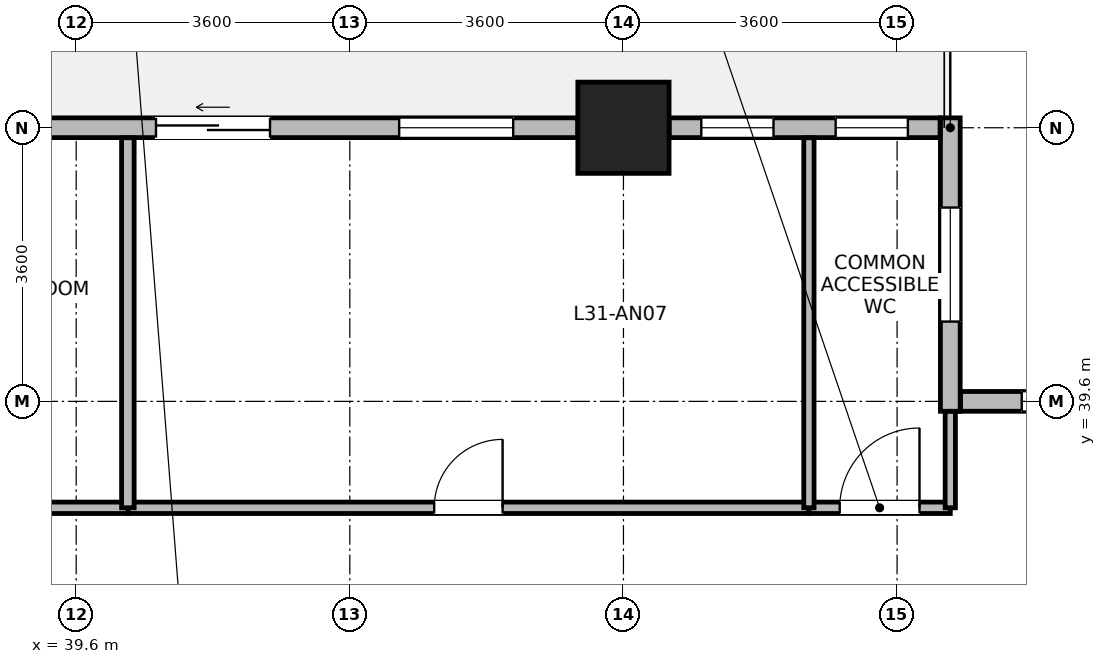
"""IFC4 building model, lengths in metres.
Left out: names, types, materials, properties, quantities, classifications, styles, units other than length and angle.
Written with IfcOpenShell. Run it as: python <this file> out.ifc"""

import sys

from ifc_helpers import new_model, si_unit, direction, frame, frame_2d, origin, origin_2d, place, context, subcontext, project, spatial, rectangle, extrude, source, transform, mapped, element, fill, save


model = new_model("IFC4")
c1 = context("Model", 3, precision=1e-05, world=origin(), true_north=direction((0.0, 1.0)))
c2 = subcontext(c1, "Body", "Model", "MODEL_VIEW")
j1 = project(units=[si_unit("LENGTHUNIT", "METRE"), si_unit("PLANEANGLEUNIT", "RADIAN")], contexts=[c1])
p1 = place(None, origin())
s1 = spatial("IfcSite", under=j1, at=p1, CompositionType="ELEMENT")
p2 = place(p1, origin())
s2 = spatial("IfcBuilding", under=s1, at=p2, CompositionType="ELEMENT")
p3 = place(p2, frame((0.0, 0.0, 123.0)))
s3 = spatial("IfcBuildingStorey", under=s2, at=p3, CompositionType="ELEMENT", Elevation=123.0)
m1 = source(origin(), c2, "Body", "SweptSolid", [
    extrude(rectangle(XDim=1.2, YDim=1.2, at=origin_2d()), origin(), (0.0, 0.0, 1.0), 3.7),
])
p4 = place(p3, frame((46.8, 43.2, 0.0), z_axis=(0.0, 0.0, 1.0), x_axis=(1.0, 0.0, 0.0)))
e1 = element("IfcColumn", 1, at=p4, inside=s3, PredefinedType="COLUMN", context=c2, shape_type="MappedRepresentation", body=[
    mapped(m1, transform((0.0, 0.0, 0.0), x_axis=(1.0, 0.0, 0.0), y_axis=(0.0, 1.0, 0.0), z_axis=(0.0, 0.0, 1.0), scale=1.0)),
])
p5 = place(p3, frame((51.235, 39.6, 0.0), z_axis=(0.0, 0.0, 1.0), x_axis=(1.0, 0.0, 0.0)))
e2 = element("IfcWall", 2, at=p5, inside=s3, PredefinedType="STANDARD", context=c2, shape_type="SweptSolid", body=[
    extrude(rectangle(XDim=9.33, YDim=0.26, at=frame_2d((4.665, 0.0))), origin(), (0.0, 0.0, 1.0), 3.43),
])
p6 = place(p5, frame((0.805, 0.0, 0.85)))
e3 = element("IfcOpeningElement", 3, at=p6, cuts=e2, PredefinedType="OPENING", context=c2, shape_type="SweptSolid", body=[
    extrude(rectangle(XDim=1.5, YDim=1.85, at=frame_2d((0.75, 0.925))), frame((0.0, 0.14, 0.0), z_axis=(0.0, -1.0, 0.0), x_axis=(1.0, 0.0, 0.0)), (0.0, 0.0, 1.0), 0.28),
])
p7 = place(p5, frame((3.915, 0.0, 0.85)))
e4 = element("IfcOpeningElement", 4, at=p7, cuts=e2, PredefinedType="OPENING", context=c2, shape_type="SweptSolid", body=[
    extrude(rectangle(XDim=1.5, YDim=1.85, at=frame_2d((0.75, 0.925))), frame((0.0, 0.14, 0.0), z_axis=(0.0, -1.0, 0.0), x_axis=(1.0, 0.0, 0.0)), (0.0, 0.0, 1.0), 0.28),
])
p8 = place(p5, frame((7.025, 0.0, 0.85)))
e5 = element("IfcOpeningElement", 5, at=p8, cuts=e2, PredefinedType="OPENING", context=c2, shape_type="SweptSolid", body=[
    extrude(rectangle(XDim=1.5, YDim=1.85, at=frame_2d((0.75, 0.925))), frame((0.0, 0.14, 0.0), z_axis=(0.0, -1.0, 0.0), x_axis=(1.0, 0.0, 0.0)), (0.0, 0.0, 1.0), 0.28),
])
p9 = place(p3, frame((51.1, 43.33, 0.0), z_axis=(0.0, 0.0, 1.0), x_axis=(0.0, -1.0, 0.0)))
e6 = element("IfcWall", 6, at=p9, inside=s3, PredefinedType="STANDARD", context=c2, shape_type="SweptSolid", body=[
    extrude(rectangle(XDim=3.86, YDim=0.26, at=frame_2d((1.93, 0.0))), origin(), (0.0, 0.0, 1.0), 3.43),
])
p10 = place(p9, frame((1.18, 0.0, 0.85)))
e7 = element("IfcOpeningElement", 7, at=p10, cuts=e6, PredefinedType="OPENING", context=c2, shape_type="SweptSolid", body=[
    extrude(rectangle(XDim=1.5, YDim=1.85, at=frame_2d((0.75, 0.925))), frame((0.0, 0.14, 0.0), z_axis=(0.0, -1.0, 0.0), x_axis=(1.0, 0.0, 0.0)), (0.0, 0.0, 1.0), 0.28),
])
p11 = place(p3, frame((47.401, 43.2, 0.0), z_axis=(0.0, 0.0, 1.0), x_axis=(1.0, 0.0, 0.0)))
e8 = element("IfcWall", 8, at=p11, inside=s3, PredefinedType="STANDARD", context=c2, shape_type="SweptSolid", body=[
    extrude(rectangle(XDim=3.564, YDim=0.26, at=frame_2d((1.782, 0.0))), origin(), (0.0, 0.0, 1.0), 3.43),
])
p12 = place(p11, frame((0.423, 0.0, 0.85)))
e9 = element("IfcOpeningElement", 9, at=p12, cuts=e8, PredefinedType="OPENING", context=c2, shape_type="SweptSolid", body=[
    extrude(rectangle(XDim=0.95, YDim=1.75, at=frame_2d((0.475, 0.875))), frame((0.0, 0.14, 0.0), z_axis=(0.0, -1.0, 0.0), x_axis=(1.0, 0.0, 0.0)), (0.0, 0.0, 1.0), 0.28),
])
p13 = place(p11, frame((2.191, 0.0, 0.85)))
e10 = element("IfcOpeningElement", 10, at=p13, cuts=e8, PredefinedType="OPENING", context=c2, shape_type="SweptSolid", body=[
    extrude(rectangle(XDim=0.95, YDim=1.75, at=frame_2d((0.475, 0.875))), frame((0.0, 0.14, 0.0), z_axis=(0.0, -1.0, 0.0), x_axis=(1.0, 0.0, 0.0)), (0.0, 0.0, 1.0), 0.28),
])
p14 = place(p3, frame((36.601, 43.2, 0.0), z_axis=(0.0, 0.0, 1.0), x_axis=(1.0, 0.0, 0.0)))
e11 = element("IfcWall", 11, at=p14, inside=s3, PredefinedType="STANDARD", context=c2, shape_type="SweptSolid", body=[
    extrude(rectangle(XDim=9.598, YDim=0.26, at=frame_2d((4.799, 0.0))), origin(), (0.0, 0.0, 1.0), 2.98),
])
p15 = place(p14, frame((4.049, 0.0, 0.0)))
e12 = element("IfcOpeningElement", 12, at=p15, cuts=e11, PredefinedType="OPENING", context=c2, shape_type="SweptSolid", body=[
    extrude(rectangle(XDim=1.5, YDim=2.15, at=frame_2d((0.75, 1.075))), frame((0.0, 0.14, 0.0), z_axis=(0.0, -1.0, 0.0), x_axis=(1.0, 0.0, 0.0)), (0.0, 0.0, 1.0), 0.28),
])
p16 = place(p14, frame((0.85, 0.0, 0.85)))
e13 = element("IfcOpeningElement", 13, at=p16, cuts=e11, PredefinedType="OPENING", context=c2, shape_type="SweptSolid", body=[
    extrude(rectangle(XDim=1.5, YDim=1.85, at=frame_2d((0.75, 0.925))), frame((0.0, 0.14, 0.0), z_axis=(0.0, -1.0, 0.0), x_axis=(1.0, 0.0, 0.0)), (0.0, 0.0, 1.0), 0.28),
])
p17 = place(p14, frame((7.248, 0.0, 0.85)))
e14 = element("IfcOpeningElement", 14, at=p17, cuts=e11, PredefinedType="OPENING", context=c2, shape_type="SweptSolid", body=[
    extrude(rectangle(XDim=1.5, YDim=1.85, at=frame_2d((0.75, 0.925))), frame((0.0, 0.14, 0.0), z_axis=(0.0, -1.0, 0.0), x_axis=(1.0, 0.0, 0.0)), (0.0, 0.0, 1.0), 0.28),
])
p18 = place(p3, frame((40.28, 38.2, 0.0), z_axis=(0.0, 0.0, 1.0), x_axis=(1.0, 0.0, 0.0)))
e15 = element("IfcWall", 15, at=p18, inside=s3, PredefinedType="PARTITIONING", context=c2, shape_type="SweptSolid", body=[
    extrude(rectangle(XDim=8.96, YDim=0.15, at=frame_2d((4.48, 0.0))), origin(), (0.0, 0.0, 1.0), 3.43),
])
p19 = place(p18, frame((4.03, 0.0, 0.0)))
e16 = element("IfcOpeningElement", 16, at=p19, cuts=e15, PredefinedType="OPENING", context=c2, shape_type="SweptSolid", body=[
    extrude(rectangle(XDim=0.9, YDim=2.08, at=frame_2d((0.45, 1.04))), frame((0.0, 0.085, 0.0), z_axis=(0.0, -1.0, 0.0), x_axis=(1.0, 0.0, 0.0)), (0.0, 0.0, 1.0), 0.17),
])
p20 = place(p3, frame((35.42, 38.2, 0.0), z_axis=(0.0, 0.0, 1.0), x_axis=(1.0, 0.0, 0.0)))
e17 = element("IfcWall", 17, at=p20, inside=s3, PredefinedType="PARTITIONING", context=c2, shape_type="SweptSolid", body=[
    extrude(rectangle(XDim=4.86, YDim=0.15, at=frame_2d((2.43, 0.0))), origin(), (0.0, 0.0, 1.0), 3.43),
])
p21 = place(p20, frame((1.955, 0.0, 0.0)))
e18 = element("IfcOpeningElement", 18, at=p21, cuts=e17, PredefinedType="OPENING", context=c2, shape_type="SweptSolid", body=[
    extrude(rectangle(XDim=0.95, YDim=2.1, at=frame_2d((0.475, 1.05))), frame((0.0, 0.085, 0.0), z_axis=(0.0, -1.0, 0.0), x_axis=(1.0, 0.0, 0.0)), (0.0, 0.0, 1.0), 0.17),
])
p22 = place(p3, frame((49.24, 38.2, 0.0), z_axis=(0.0, 0.0, 1.0), x_axis=(1.0, 0.0, 0.0)))
e19 = element("IfcWall", 19, at=p22, inside=s3, PredefinedType="PARTITIONING", context=c2, shape_type="SweptSolid", body=[
    extrude(rectangle(XDim=1.86, YDim=0.15, at=frame_2d((0.93, 0.0))), origin(), (0.0, 0.0, 1.0), 3.43),
])
p23 = place(p22, frame((0.405, 0.0, 0.0)))
e20 = element("IfcOpeningElement", 20, at=p23, cuts=e19, PredefinedType="OPENING", context=c2, shape_type="SweptSolid", body=[
    extrude(rectangle(XDim=1.05, YDim=2.12, at=frame_2d((0.525, 1.06))), frame((0.0, 0.085, 0.0), z_axis=(0.0, -1.0, 0.0), x_axis=(1.0, 0.0, 0.0)), (0.0, 0.0, 1.0), 0.17),
])
p24 = place(p3, frame((40.28, 38.2, 0.0), z_axis=(0.0, 0.0, 1.0), x_axis=(0.0, 1.0, 0.0)))
e21 = element("IfcWall", 21, at=p24, inside=s3, PredefinedType="PARTITIONING", context=c2, shape_type="SweptSolid", body=[
    extrude(rectangle(XDim=4.868, YDim=0.165, at=frame_2d((2.434, 0.0))), origin(), (0.0, 0.0, 1.0), 3.43),
])
p25 = place(p3, frame((49.24, 38.2, 0.0), z_axis=(0.0, 0.0, 1.0), x_axis=(0.0, 1.0, 0.0)))
e22 = element("IfcWall", 22, at=p25, inside=s3, PredefinedType="PARTITIONING", context=c2, shape_type="SweptSolid", body=[
    extrude(rectangle(XDim=4.868, YDim=0.135, at=frame_2d((2.434, 0.0))), origin(), (0.0, 0.0, 1.0), 3.43),
])
p26 = place(p3, frame((51.1, 38.2, 0.0), z_axis=(0.0, 0.0, 1.0), x_axis=(0.0, 1.0, 0.0)))
e23 = element("IfcWall", 23, at=p26, inside=s3, PredefinedType="PARTITIONING", context=c2, shape_type="SweptSolid", body=[
    extrude(rectangle(XDim=1.268, YDim=0.135, at=frame_2d((0.634, 0.0))), origin(), (0.0, 0.0, 1.0), 3.43),
])
p27 = place(p6, origin())
e24 = element("IfcWindow", 24, at=p27, inside=s3, PartitioningType="SINGLE_PANEL", PredefinedType="WINDOW", context=c2, shape_type="SweptSolid", body=[
    extrude(rectangle(XDim=1.5, YDim=1.85, at=frame_2d((0.75, 0.925))), frame((0.0, 0.03, 0.0), z_axis=(0.0, -1.0, 0.0), x_axis=(1.0, 0.0, 0.0)), (0.0, 0.0, 1.0), 0.06),
])
fill(e3, e24)
p28 = place(p10, origin())
e25 = element("IfcWindow", 25, at=p28, inside=s3, PartitioningType="SINGLE_PANEL", PredefinedType="WINDOW", context=c2, shape_type="SweptSolid", body=[
    extrude(rectangle(XDim=1.5, YDim=1.85, at=frame_2d((0.75, 0.925))), frame((0.0, 0.03, 0.0), z_axis=(0.0, -1.0, 0.0), x_axis=(1.0, 0.0, 0.0)), (0.0, 0.0, 1.0), 0.06),
])
fill(e7, e25)
p29 = place(p12, origin())
e26 = element("IfcWindow", 26, at=p29, inside=s3, PartitioningType="SINGLE_PANEL", PredefinedType="WINDOW", context=c2, shape_type="SweptSolid", body=[
    extrude(rectangle(XDim=0.95, YDim=1.75, at=frame_2d((0.475, 0.875))), frame((0.0, 0.03, 0.0), z_axis=(0.0, -1.0, 0.0), x_axis=(1.0, 0.0, 0.0)), (0.0, 0.0, 1.0), 0.06),
])
fill(e9, e26)
p30 = place(p13, origin())
e27 = element("IfcWindow", 27, at=p30, inside=s3, PartitioningType="SINGLE_PANEL", PredefinedType="WINDOW", context=c2, shape_type="SweptSolid", body=[
    extrude(rectangle(XDim=0.95, YDim=1.75, at=frame_2d((0.475, 0.875))), frame((0.0, 0.03, 0.0), z_axis=(0.0, -1.0, 0.0), x_axis=(1.0, 0.0, 0.0)), (0.0, 0.0, 1.0), 0.06),
])
fill(e10, e27)
p31 = place(p15, origin())
e28 = element("IfcDoor", 28, at=p31, inside=s3, OperationType="SLIDING_TO_LEFT", PredefinedType="DOOR", context=c2, shape_type="SweptSolid", body=[
    extrude(rectangle(XDim=1.5, YDim=2.15, at=frame_2d((0.75, 1.075))), frame((0.0, 0.025, 0.0), z_axis=(0.0, -1.0, 0.0), x_axis=(1.0, 0.0, 0.0)), (0.0, 0.0, 1.0), 0.05),
])
fill(e12, e28)
p32 = place(p17, origin())
e29 = element("IfcWindow", 29, at=p32, inside=s3, PartitioningType="SINGLE_PANEL", PredefinedType="WINDOW", context=c2, shape_type="SweptSolid", body=[
    extrude(rectangle(XDim=1.5, YDim=1.85, at=frame_2d((0.75, 0.925))), frame((0.0, 0.03, 0.0), z_axis=(0.0, -1.0, 0.0), x_axis=(1.0, 0.0, 0.0)), (0.0, 0.0, 1.0), 0.06),
])
fill(e14, e29)
p33 = place(p19, origin())
e30 = element("IfcDoor", 30, at=p33, inside=s3, OperationType="SINGLE_SWING_RIGHT", PredefinedType="DOOR", context=c2, shape_type="SweptSolid", body=[
    extrude(rectangle(XDim=0.9, YDim=2.08, at=frame_2d((0.45, 1.04))), frame((0.0, 0.025, 0.0), z_axis=(0.0, -1.0, 0.0), x_axis=(1.0, 0.0, 0.0)), (0.0, 0.0, 1.0), 0.05),
])
fill(e16, e30)
p34 = place(p23, origin())
e31 = element("IfcDoor", 31, at=p34, inside=s3, OperationType="SINGLE_SWING_RIGHT", PredefinedType="DOOR", context=c2, shape_type="SweptSolid", body=[
    extrude(rectangle(XDim=1.05, YDim=2.12, at=frame_2d((0.525, 1.06))), frame((0.0, 0.025, 0.0), z_axis=(0.0, -1.0, 0.0), x_axis=(1.0, 0.0, 0.0)), (0.0, 0.0, 1.0), 0.05),
])
fill(e20, e31)
save(model, sys.argv[1])
